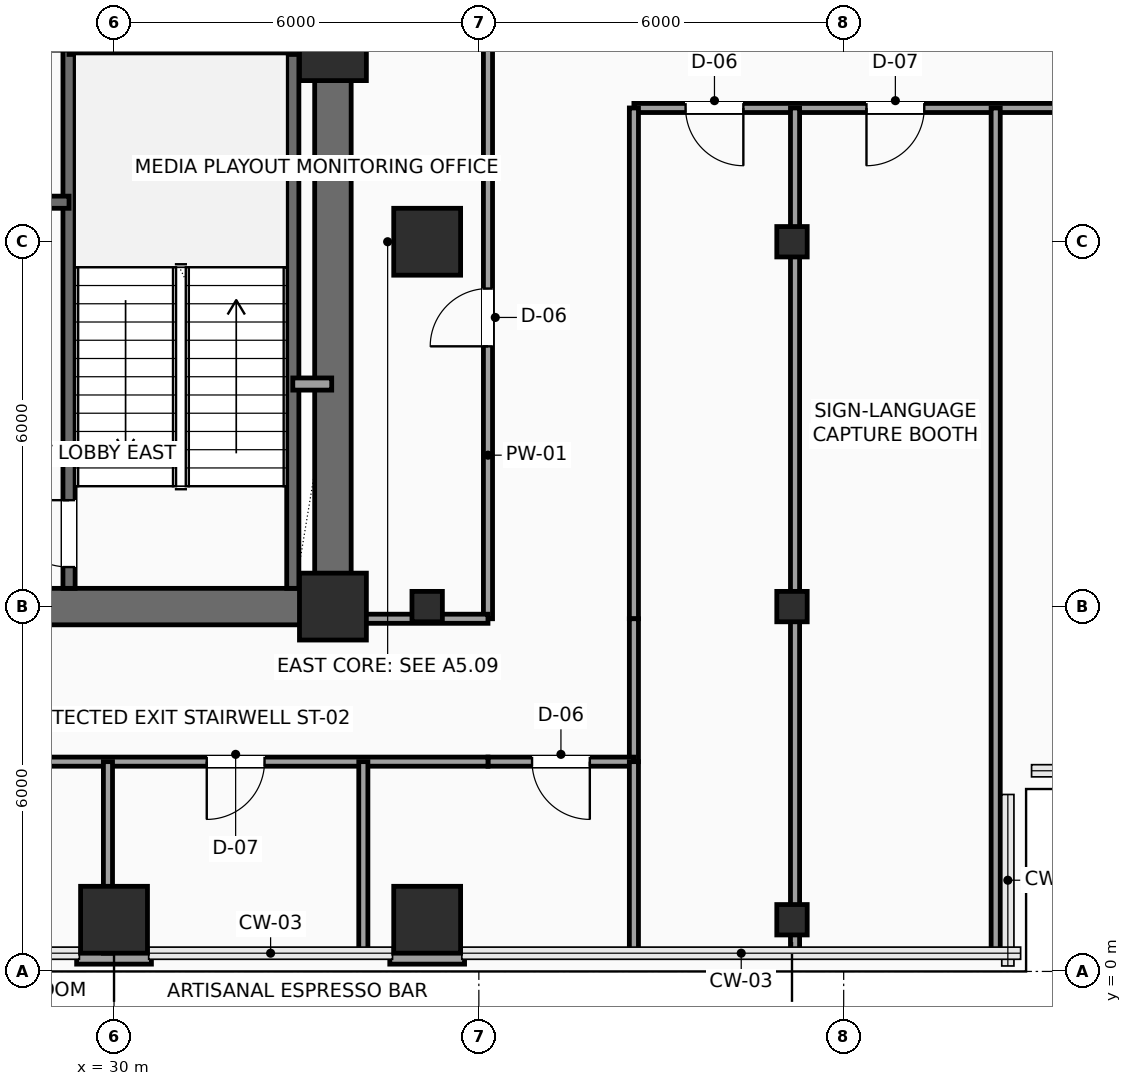
"""IFC4 building model, lengths in metres.
Left out: names, types, materials, properties, quantities, classifications, styles, units other than length and angle.
Written with IfcOpenShell. Run it as: python <this file> out.ifc"""

import sys

from ifc_helpers import new_model, si_unit, direction, frame, frame_2d, origin, origin_2d, place, context, subcontext, project, spatial, rectangle, hollow_rectangle, extrude, element, fill, save


model = new_model("IFC4")
c1 = context("Model", 3, precision=1e-05, world=origin(), true_north=direction((0.0, 1.0)))
c2 = subcontext(c1, "Body", "Model", "MODEL_VIEW")
j1 = project(units=[si_unit("LENGTHUNIT", "METRE"), si_unit("PLANEANGLEUNIT", "RADIAN")], contexts=[c1])
p1 = place(None, origin())
s1 = spatial("IfcSite", under=j1, at=p1, CompositionType="ELEMENT")
p2 = place(p1, origin())
s2 = spatial("IfcBuilding", under=s1, at=p2, CompositionType="ELEMENT")
p3 = place(p2, frame((0.0, 0.0, 156.9)))
s3 = spatial("IfcBuildingStorey", under=s2, at=p3, CompositionType="ELEMENT", Elevation=156.9)
for number, where, z_axis, x_axis in (
    (1, (33.6, 6.0, 0.0), (0.0, 0.0, 1.0), (1.0, 0.0, 0.0)),
    (2, (33.6, 15.2, 0.0), (0.0, 0.0, 1.0), (1.0, 0.0, 0.0)),
    (3, (30.0, 0.85, 0.0), (0.0, 0.0, 1.0), (1.0, 0.0, 0.0)),
    (4, (35.15, 0.85, 0.0), (0.0, 0.0, 1.0), (1.0, 0.0, 0.0)),
):
    element("IfcColumn", number, at=place(p3, frame(where, z_axis=z_axis, x_axis=x_axis)), inside=s3, PredefinedType="COLUMN", context=c2, shape_type="SweptSolid", body=[
        extrude(rectangle(XDim=1.1, YDim=1.1, at=origin_2d()), origin(), (0.0, 0.0, 1.0), 3.75),
    ])
p4 = place(p3, frame((35.15, 6.0, 0.0), z_axis=(0.0, 0.0, 1.0), x_axis=(1.0, 0.0, 0.0)))
e5 = element("IfcColumn", 5, at=p4, inside=s3, PredefinedType="COLUMN", context=c2, shape_type="SweptSolid", body=[
    extrude(hollow_rectangle(XDim=0.5, YDim=0.5, WallThickness=0.025, InnerFilletRadius=0.025, OuterFilletRadius=0.04, at=origin_2d()), origin(), (0.0, 0.0, 1.0), 3.75),
])
p5 = place(p3, frame((35.15, 12.0, 0.0), z_axis=(0.0, 0.0, 1.0), x_axis=(1.0, 0.0, 0.0)))
e6 = element("IfcColumn", 6, at=p5, inside=s3, PredefinedType="COLUMN", context=c2, shape_type="SweptSolid", body=[
    extrude(rectangle(XDim=1.1, YDim=1.1, at=origin_2d()), origin(), (0.0, 0.0, 1.0), 3.75),
])
for number, where, z_axis, x_axis in (
    (7, (41.15, 0.85, 0.0), (0.0, 0.0, 1.0), (1.0, 0.0, 0.0)),
    (8, (41.15, 6.0, 0.0), (0.0, 0.0, 1.0), (1.0, 0.0, 0.0)),
    (9, (41.15, 12.0, 0.0), (0.0, 0.0, 1.0), (1.0, 0.0, 0.0)),
):
    element("IfcColumn", number, at=place(p3, frame(where, z_axis=z_axis, x_axis=x_axis)), inside=s3, PredefinedType="COLUMN", context=c2, shape_type="SweptSolid", body=[
        extrude(hollow_rectangle(XDim=0.5, YDim=0.5, WallThickness=0.025, InnerFilletRadius=0.025, OuterFilletRadius=0.04, at=origin_2d()), origin(), (0.0, 0.0, 1.0), 3.75),
    ])
for number, where, z_axis, x_axis in (
    (10, (35.765, 0.24, 0.0), (0.0, 0.0, 1.0), (-1.0, 0.0, 0.0)),
    (11, (30.615, 0.24, 0.0), (0.0, 0.0, 1.0), (-1.0, 0.0, 0.0)),
):
    element("IfcWall", number, at=place(p3, frame(where, z_axis=z_axis, x_axis=x_axis)), inside=s3, PredefinedType="SOLIDWALL", context=c2, shape_type="SweptSolid", body=[
        extrude(rectangle(XDim=1.23, YDim=0.24, at=frame_2d((0.615, 0.0))), origin(), (0.0, 0.0, 1.0), 3.525),
    ])
p6 = place(p3, frame((24.0, 6.0, 0.0), z_axis=(0.0, 0.0, 1.0), x_axis=(1.0, 0.0, 0.0)))
e12 = element("IfcWall", 12, at=p6, inside=s3, PredefinedType="SHEAR", context=c2, shape_type="SweptSolid", body=[
    extrude(rectangle(XDim=9.6, YDim=0.6, at=frame_2d((4.8, 0.0))), origin(), (0.0, 0.0, 1.0), 3.525),
])
p7 = place(p3, frame((33.6, 6.0, 0.0), z_axis=(0.0, 0.0, 1.0), x_axis=(0.0, 1.0, 0.0)))
e13 = element("IfcWall", 13, at=p7, inside=s3, PredefinedType="SHEAR", context=c2, shape_type="SweptSolid", body=[
    extrude(rectangle(XDim=12.0, YDim=0.6, at=frame_2d((6.0, 0.0))), origin(), (0.0, 0.0, 1.0), 3.525),
])
p8 = place(p7, frame((10.2, 0.0, 0.0)))
e14 = element("IfcOpeningElement", 14, at=p8, cuts=e13, PredefinedType="OPENING", context=c2, shape_type="SweptSolid", body=[
    extrude(rectangle(XDim=0.9, YDim=2.15, at=frame_2d((0.45, 1.075))), frame((0.0, 0.31, 0.0), z_axis=(0.0, -1.0, 0.0), x_axis=(1.0, 0.0, 0.0)), (0.0, 0.0, 1.0), 0.62),
])
p9 = place(p3, frame((29.26, 6.3, 0.0), z_axis=(0.0, 0.0, 1.0), x_axis=(0.0, 1.0, 0.0)))
e15 = element("IfcWall", 15, at=p9, inside=s3, PredefinedType="SHEAR", context=c2, shape_type="SweptSolid", body=[
    extrude(rectangle(XDim=8.88, YDim=0.2, at=frame_2d((4.44, 0.0))), origin(), (0.0, 0.0, 1.0), 3.525),
])
p10 = place(p9, frame((0.35, 0.0, 0.0)))
e16 = element("IfcOpeningElement", 16, at=p10, cuts=e15, PredefinedType="OPENING", context=c2, shape_type="SweptSolid", body=[
    extrude(rectangle(XDim=1.1, YDim=2.2, at=frame_2d((0.55, 1.1))), frame((0.0, 0.11, 0.0), z_axis=(0.0, -1.0, 0.0), x_axis=(1.0, 0.0, 0.0)), (0.0, 0.0, 1.0), 0.22),
])
p11 = place(p3, frame((32.94, 6.3, 0.0), z_axis=(0.0, 0.0, 1.0), x_axis=(0.0, 1.0, 0.0)))
e17 = element("IfcWall", 17, at=p11, inside=s3, PredefinedType="SHEAR", context=c2, shape_type="SweptSolid", body=[
    extrude(rectangle(XDim=8.88, YDim=0.2, at=frame_2d((4.44, 0.0))), origin(), (0.0, 0.0, 1.0), 3.525),
])
p12 = place(p3, frame((29.26, 15.18, 0.0), z_axis=(0.0, 0.0, 1.0), x_axis=(1.0, 0.0, 0.0)))
e18 = element("IfcWall", 18, at=p12, inside=s3, PredefinedType="SHEAR", context=c2, shape_type="SweptSolid", body=[
    extrude(rectangle(XDim=4.04, YDim=0.2, at=frame_2d((2.02, 0.0))), origin(), (0.0, 0.0, 1.0), 3.525),
])
p13 = place(p3, frame((26.42, 12.65, 0.0), z_axis=(0.0, 0.0, 1.0), x_axis=(1.0, 0.0, 0.0)))
e19 = element("IfcWall", 19, at=p13, inside=s3, PredefinedType="SHEAR", context=c2, shape_type="SweptSolid", body=[
    extrude(rectangle(XDim=2.84, YDim=0.2, at=frame_2d((1.42, 0.0))), origin(), (0.0, 0.0, 1.0), 3.525),
])
p14 = place(p13, frame((0.9, 0.0, 0.0)))
e20 = element("IfcOpeningElement", 20, at=p14, cuts=e19, PredefinedType="OPENING", context=c2, shape_type="SweptSolid", body=[
    extrude(rectangle(XDim=0.9, YDim=2.15, at=frame_2d((0.45, 1.075))), frame((0.0, 0.11, 0.0), z_axis=(0.0, -1.0, 0.0), x_axis=(1.0, 0.0, 0.0)), (0.0, 0.0, 1.0), 0.22),
])
p15 = place(p3, frame((32.94, 9.66, 0.0), z_axis=(0.0, 0.0, 1.0), x_axis=(1.0, 0.0, 0.0)))
e21 = element("IfcWall", 21, at=p15, inside=s3, PredefinedType="SOLIDWALL", context=c2, shape_type="SweptSolid", body=[
    extrude(rectangle(XDim=0.64, YDim=0.2, at=frame_2d((0.32, 0.0))), origin(), (0.0, 0.0, 1.0), 3.525),
])
p16 = place(p3, frame((36.15, 5.8, 0.0), z_axis=(0.0, 0.0, 1.0), x_axis=(0.0, 1.0, 0.0)))
e22 = element("IfcWall", 22, at=p16, inside=s3, PredefinedType="PARTITIONING", context=c2, shape_type="SweptSolid", body=[
    extrude(rectangle(XDim=10.08, YDim=0.15, at=frame_2d((5.04, 0.0))), origin(), (0.0, 0.0, 1.0), 3.525),
])
p17 = place(p16, frame((4.48, 0.0, 0.0)))
e23 = element("IfcOpeningElement", 23, at=p17, cuts=e22, PredefinedType="OPENING", context=c2, shape_type="SweptSolid", body=[
    extrude(rectangle(XDim=0.95, YDim=2.15, at=frame_2d((0.475, 1.075))), frame((0.0, 0.085, 0.0), z_axis=(0.0, -1.0, 0.0), x_axis=(1.0, 0.0, 0.0)), (0.0, 0.0, 1.0), 0.17),
])
p18 = place(p3, frame((47.7, 14.2, 0.0), z_axis=(0.0, 0.0, 1.0), x_axis=(-1.0, 0.0, 0.0)))
e24 = element("IfcWall", 24, at=p18, inside=s3, PredefinedType="PARTITIONING", context=c2, shape_type="SweptSolid", body=[
    extrude(rectangle(XDim=9.15, YDim=0.15, at=frame_2d((4.575, 0.0))), origin(), (0.0, 0.0, 1.0), 3.525),
])
p19 = place(p18, frame((7.35, 0.0, 0.0)))
e25 = element("IfcOpeningElement", 25, at=p19, cuts=e24, PredefinedType="OPENING", context=c2, shape_type="SweptSolid", body=[
    extrude(rectangle(XDim=0.95, YDim=2.15, at=frame_2d((0.475, 1.075))), frame((0.0, 0.085, 0.0), z_axis=(0.0, -1.0, 0.0), x_axis=(1.0, 0.0, 0.0)), (0.0, 0.0, 1.0), 0.17),
])
p20 = place(p18, frame((4.375, 0.0, 0.0)))
e26 = element("IfcOpeningElement", 26, at=p20, cuts=e24, PredefinedType="OPENING", context=c2, shape_type="SweptSolid", body=[
    extrude(rectangle(XDim=0.95, YDim=2.15, at=frame_2d((0.475, 1.075))), frame((0.0, 0.085, 0.0), z_axis=(0.0, -1.0, 0.0), x_axis=(1.0, 0.0, 0.0)), (0.0, 0.0, 1.0), 0.17),
])
p21 = place(p3, frame((38.55, 14.2, 0.0), z_axis=(0.0, 0.0, 1.0), x_axis=(0.0, -1.0, 0.0)))
e27 = element("IfcWall", 27, at=p21, inside=s3, PredefinedType="PARTITIONING", context=c2, shape_type="SweptSolid", body=[
    extrude(rectangle(XDim=8.4, YDim=0.15, at=frame_2d((4.2, 0.0))), origin(), (0.0, 0.0, 1.0), 3.525),
])
p22 = place(p3, frame((38.55, 5.8, 0.0), z_axis=(0.0, 0.0, 1.0), x_axis=(0.0, -1.0, 0.0)))
e28 = element("IfcWall", 28, at=p22, inside=s3, PredefinedType="PARTITIONING", context=c2, shape_type="SweptSolid", body=[
    extrude(rectangle(XDim=2.35, YDim=0.15, at=frame_2d((1.175, 0.0))), origin(), (0.0, 0.0, 1.0), 3.525),
])
p23 = place(p3, frame((38.55, 3.45, 0.0), z_axis=(0.0, 0.0, 1.0), x_axis=(-1.0, 0.0, 0.0)))
e29 = element("IfcWall", 29, at=p23, inside=s3, PredefinedType="PARTITIONING", context=c2, shape_type="SweptSolid", body=[
    extrude(rectangle(XDim=2.4, YDim=0.15, at=frame_2d((1.2, 0.0))), origin(), (0.0, 0.0, 1.0), 3.067),
])
p24 = place(p23, frame((0.725, 0.0, 0.0)))
e30 = element("IfcOpeningElement", 30, at=p24, cuts=e29, PredefinedType="OPENING", context=c2, shape_type="SweptSolid", body=[
    extrude(rectangle(XDim=0.95, YDim=2.15, at=frame_2d((0.475, 1.075))), frame((0.0, 0.085, 0.0), z_axis=(0.0, -1.0, 0.0), x_axis=(1.0, 0.0, 0.0)), (0.0, 0.0, 1.0), 0.17),
])
p25 = place(p3, frame((36.15, 3.45, 0.0), z_axis=(0.0, 0.0, 1.0), x_axis=(-1.0, 0.0, 0.0)))
e31 = element("IfcWall", 31, at=p25, inside=s3, PredefinedType="PARTITIONING", context=c2, shape_type="SweptSolid", body=[
    extrude(rectangle(XDim=12.2, YDim=0.15, at=frame_2d((6.1, 0.0))), origin(), (0.0, 0.0, 1.0), 3.067),
])
p26 = place(p25, frame((10.8, 0.0, 0.0)))
e32 = element("IfcOpeningElement", 32, at=p26, cuts=e31, PredefinedType="OPENING", context=c2, shape_type="SweptSolid", body=[
    extrude(rectangle(XDim=0.95, YDim=2.15, at=frame_2d((0.475, 1.075))), frame((0.0, 0.085, 0.0), z_axis=(0.0, -1.0, 0.0), x_axis=(1.0, 0.0, 0.0)), (0.0, 0.0, 1.0), 0.17),
])
p27 = place(p25, frame((7.825, 0.0, 0.0)))
e33 = element("IfcOpeningElement", 33, at=p27, cuts=e31, PredefinedType="OPENING", context=c2, shape_type="SweptSolid", body=[
    extrude(rectangle(XDim=0.95, YDim=2.15, at=frame_2d((0.475, 1.075))), frame((0.0, 0.085, 0.0), z_axis=(0.0, -1.0, 0.0), x_axis=(1.0, 0.0, 0.0)), (0.0, 0.0, 1.0), 0.17),
])
p28 = place(p25, frame((3.675, 0.0, 0.0)))
e34 = element("IfcOpeningElement", 34, at=p28, cuts=e31, PredefinedType="OPENING", context=c2, shape_type="SweptSolid", body=[
    extrude(rectangle(XDim=0.95, YDim=2.15, at=frame_2d((0.475, 1.075))), frame((0.0, 0.085, 0.0), z_axis=(0.0, -1.0, 0.0), x_axis=(1.0, 0.0, 0.0)), (0.0, 0.0, 1.0), 0.17),
])
for number, where, z_axis, x_axis in (
    (35, (29.9, 0.3, 0.0), (0.0, 0.0, 1.0), (0.0, 1.0, 0.0)),
    (36, (34.1, 0.3, 0.0), (0.0, 0.0, 1.0), (0.0, 1.0, 0.0)),
    (37, (38.55, 0.3, 0.0), (0.0, 0.0, 1.0), (0.0, 1.0, 0.0)),
):
    element("IfcWall", number, at=place(p3, frame(where, z_axis=z_axis, x_axis=x_axis)), inside=s3, PredefinedType="PARTITIONING", context=c2, shape_type="SweptSolid", body=[
        extrude(rectangle(XDim=3.15, YDim=0.15, at=frame_2d((1.575, 0.0))), origin(), (0.0, 0.0, 1.0), 3.525),
    ])
p29 = place(p3, frame((33.65, 5.8, 0.0), z_axis=(0.0, 0.0, 1.0), x_axis=(1.0, 0.0, 0.0)))
e38 = element("IfcWall", 38, at=p29, inside=s3, PredefinedType="PARTITIONING", context=c2, shape_type="SweptSolid", body=[
    extrude(rectangle(XDim=2.5, YDim=0.15, at=frame_2d((1.25, 0.0))), origin(), (0.0, 0.0, 1.0), 3.017),
])
p30 = place(p3, frame((41.2, 0.3, 0.0), z_axis=(0.0, 0.0, 1.0), x_axis=(0.0, 1.0, 0.0)))
e39 = element("IfcWall", 39, at=p30, inside=s3, PredefinedType="PARTITIONING", context=c2, shape_type="SweptSolid", body=[
    extrude(rectangle(XDim=13.9, YDim=0.15, at=frame_2d((6.95, 0.0))), origin(), (0.0, 0.0, 1.0), 3.017),
])
p31 = place(p3, frame((44.5, 0.3, 0.0), z_axis=(0.0, 0.0, 1.0), x_axis=(0.0, 1.0, 0.0)))
e40 = element("IfcWall", 40, at=p31, inside=s3, PredefinedType="PARTITIONING", context=c2, shape_type="SweptSolid", body=[
    extrude(rectangle(XDim=13.9, YDim=0.15, at=frame_2d((6.95, 0.0))), origin(), (0.0, 0.0, 1.0), 3.525),
])
p32 = place(p10, origin())
e41 = element("IfcDoor", 41, at=p32, inside=s3, OperationType="SINGLE_SWING_RIGHT", PredefinedType="DOOR", context=c2, shape_type="SweptSolid", body=[
    extrude(rectangle(XDim=1.1, YDim=2.2, at=frame_2d((0.55, 1.1))), frame((0.0, 0.025, 0.0), z_axis=(0.0, -1.0, 0.0), x_axis=(1.0, 0.0, 0.0)), (0.0, 0.0, 1.0), 0.05),
])
fill(e16, e41)
p33 = place(p17, origin())
e42 = element("IfcDoor", 42, at=p33, inside=s3, OperationType="SINGLE_SWING_LEFT", PredefinedType="DOOR", context=c2, shape_type="SweptSolid", body=[
    extrude(rectangle(XDim=0.95, YDim=2.15, at=frame_2d((0.475, 1.075))), frame((0.0, 0.025, 0.0), z_axis=(0.0, -1.0, 0.0), x_axis=(1.0, 0.0, 0.0)), (0.0, 0.0, 1.0), 0.05),
])
fill(e23, e42)
p34 = place(p19, origin())
e43 = element("IfcDoor", 43, at=p34, inside=s3, OperationType="SINGLE_SWING_LEFT", PredefinedType="DOOR", context=c2, shape_type="SweptSolid", body=[
    extrude(rectangle(XDim=0.95, YDim=2.15, at=frame_2d((0.475, 1.075))), frame((0.0, 0.025, 0.0), z_axis=(0.0, -1.0, 0.0), x_axis=(1.0, 0.0, 0.0)), (0.0, 0.0, 1.0), 0.05),
])
fill(e25, e43)
p35 = place(p20, origin())
e44 = element("IfcDoor", 44, at=p35, inside=s3, OperationType="SINGLE_SWING_RIGHT", PredefinedType="DOOR", context=c2, shape_type="SweptSolid", body=[
    extrude(rectangle(XDim=0.95, YDim=2.15, at=frame_2d((0.475, 1.075))), frame((0.0, 0.025, 0.0), z_axis=(0.0, -1.0, 0.0), x_axis=(1.0, 0.0, 0.0)), (0.0, 0.0, 1.0), 0.05),
])
fill(e26, e44)
p36 = place(p24, origin())
e45 = element("IfcDoor", 45, at=p36, inside=s3, OperationType="SINGLE_SWING_LEFT", PredefinedType="DOOR", context=c2, shape_type="SweptSolid", body=[
    extrude(rectangle(XDim=0.95, YDim=2.15, at=frame_2d((0.475, 1.075))), frame((0.0, 0.025, 0.0), z_axis=(0.0, -1.0, 0.0), x_axis=(1.0, 0.0, 0.0)), (0.0, 0.0, 1.0), 0.05),
])
fill(e30, e45)
p37 = place(p28, origin())
e46 = element("IfcDoor", 46, at=p37, inside=s3, OperationType="SINGLE_SWING_RIGHT", PredefinedType="DOOR", context=c2, shape_type="SweptSolid", body=[
    extrude(rectangle(XDim=0.95, YDim=2.15, at=frame_2d((0.475, 1.075))), frame((0.0, 0.025, 0.0), z_axis=(0.0, -1.0, 0.0), x_axis=(1.0, 0.0, 0.0)), (0.0, 0.0, 1.0), 0.05),
])
fill(e34, e46)
save(model, sys.argv[1])
